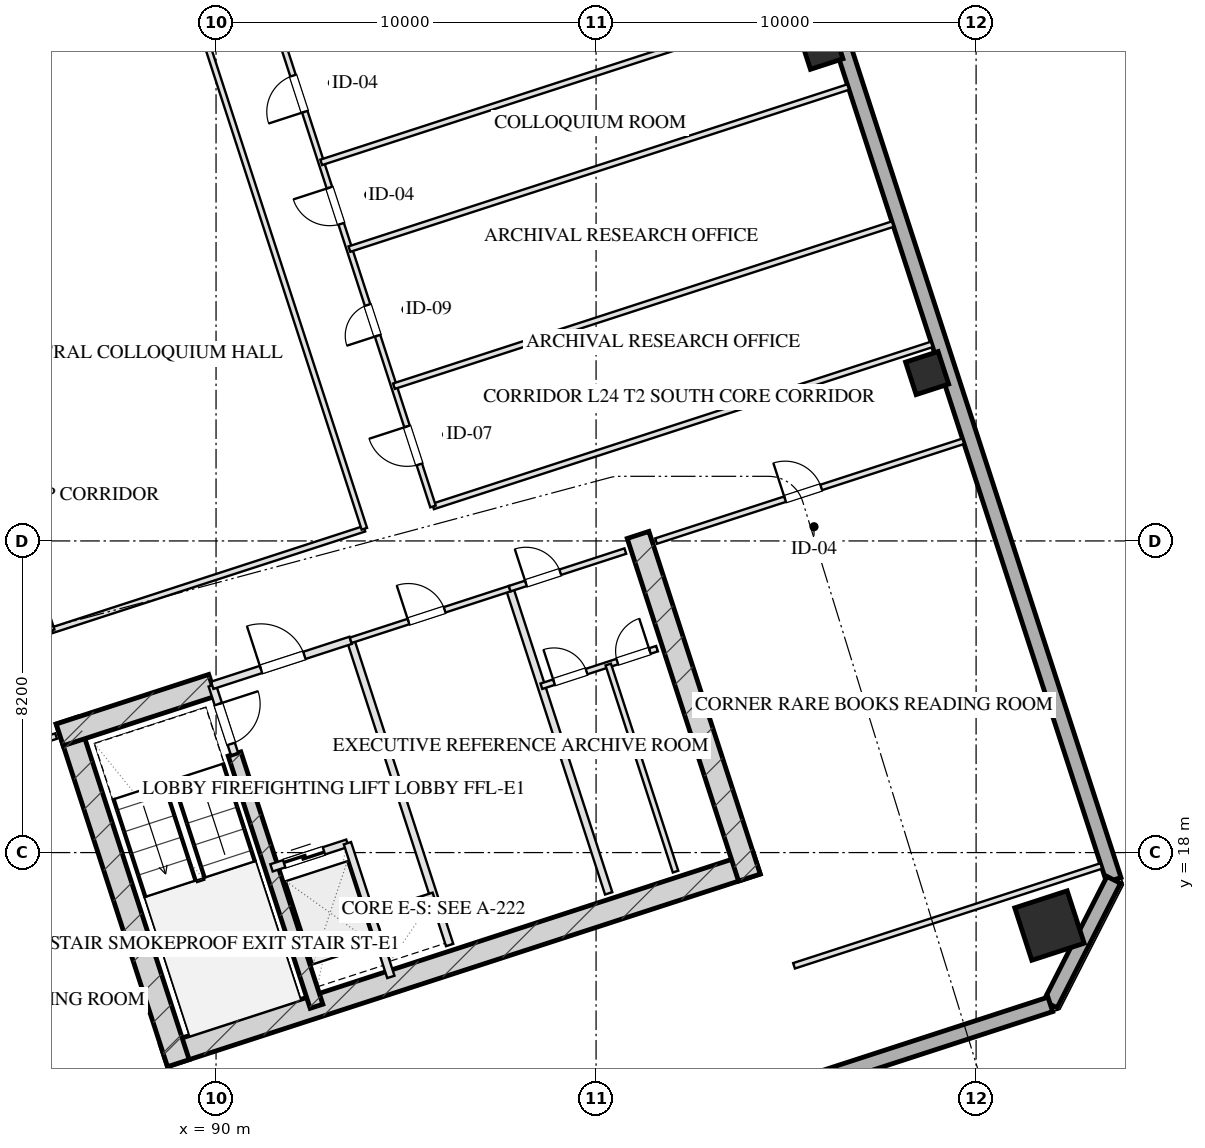
"""IFC4 building model, lengths in metres.
Left out: names, types, materials, properties, quantities, classifications, styles, units other than length and angle.
Written with IfcOpenShell. Run it as: python <this file> out.ifc"""

import sys

from ifc_helpers import new_model, si_unit, direction, frame, frame_2d, origin, origin_2d, place, context, subcontext, project, spatial, rectangle, hollow_rectangle, extrude, element, fill, save


model = new_model("IFC4")
c1 = context("Model", 3, precision=1e-05, world=origin(), true_north=direction((0.0, 1.0)))
c2 = subcontext(c1, "Body", "Model", "MODEL_VIEW")
j1 = project(units=[si_unit("LENGTHUNIT", "METRE"), si_unit("PLANEANGLEUNIT", "RADIAN")], contexts=[c1])
p1 = place(None, origin())
s1 = spatial("IfcSite", under=j1, at=p1, CompositionType="ELEMENT")
p2 = place(p1, origin())
s2 = spatial("IfcBuilding", under=s1, at=p2, CompositionType="ELEMENT")
p3 = place(p2, frame((0.0, 0.0, 96.6)))
s3 = spatial("IfcBuildingStorey", under=s2, at=p3, CompositionType="ELEMENT", Elevation=96.6)
p4 = place(p3, frame((88.63, 12.652, 0.0), z_axis=(0.0, 0.0, 1.0), x_axis=(0.95105714907, 0.309015046886, 0.0)))
e1 = element("IfcWall", 1, at=p4, inside=s3, PredefinedType="SHEAR", context=c2, shape_type="SweptSolid", body=[
    extrude(rectangle(XDim=16.4, YDim=0.6, at=frame_2d((8.2, 0.0))), origin(), (0.0, 0.0, 1.0), 3.45),
])
p5 = place(p3, frame((86.078, 21.475, 0.0), z_axis=(0.0, 0.0, 1.0), x_axis=(0.309017938678, -0.951056209472, 0.0)))
e2 = element("IfcWall", 2, at=p5, inside=s3, PredefinedType="SHEAR", context=c2, shape_type="SweptSolid", body=[
    extrude(rectangle(XDim=9.48, YDim=0.6, at=frame_2d((4.74, 0.0))), origin(), (0.0, 0.0, 1.0), 3.45),
])
p6 = place(p3, frame((101.105, 26.358, 0.0), z_axis=(0.0, 0.0, 1.0), x_axis=(0.309010370028, -0.95105866865, 0.0)))
e3 = element("IfcWall", 3, at=p6, inside=s3, PredefinedType="SHEAR", context=c2, shape_type="SweptSolid", body=[
    extrude(rectangle(XDim=9.48, YDim=0.6, at=frame_2d((4.74, 0.0))), origin(), (0.0, 0.0, 1.0), 3.45),
])
p7 = place(p3, frame((90.486, 20.594, 0.0), z_axis=(0.0, 0.0, 1.0), x_axis=(0.309020428229, -0.951055400562, 0.0)))
e4 = element("IfcWall", 4, at=p7, inside=s3, PredefinedType="SHEAR", context=c2, shape_type="SweptSolid", body=[
    extrude(rectangle(XDim=6.98, YDim=0.35, at=frame_2d((3.49, 0.0))), origin(), (0.0, 0.0, 1.0), 3.45),
])
p8 = place(p3, frame((85.886, 21.097, 0.0), z_axis=(0.0, 0.0, 1.0), x_axis=(0.951068073652, 0.308981422225, 0.0)))
e5 = element("IfcWall", 5, at=p8, inside=s3, PredefinedType="SHEAR", context=c2, shape_type="SweptSolid", body=[
    extrude(rectangle(XDim=4.22, YDim=0.6, at=frame_2d((2.11, 0.0))), origin(), (0.0, 0.0, 1.0), 3.45),
])
p9 = place(p3, frame((111.931, 16.08, 0.0), z_axis=(0.0, 0.0, 1.0), x_axis=(0.951056516295, 0.309016994375, 0.0)))
e6 = element("IfcColumn", 6, at=p9, inside=s3, PredefinedType="COLUMN", context=c2, shape_type="SweptSolid", body=[
    extrude(hollow_rectangle(XDim=1.45, YDim=1.45, WallThickness=0.05, at=origin_2d()), origin(), (0.0, 0.0, 1.0), 3.451),
])
for number, where, z_axis, x_axis in (
    (7, (108.711, 30.616, 0.0), (0.0, 0.0, 1.0), (0.951, 0.309, 0.0)),
    (8, (105.93, 39.176, 0.0), (0.0, 0.0, 1.0), (0.951, 0.309, 0.0)),
):
    element("IfcColumn", number, at=place(p3, frame(where, z_axis=z_axis, x_axis=x_axis)), inside=s3, PredefinedType="COLUMN", context=c2, shape_type="SweptSolid", body=[
        extrude(hollow_rectangle(XDim=0.9, YDim=0.9, WallThickness=0.032, at=origin_2d()), origin(), (0.0, 0.0, 1.0), 3.451),
    ])
p10 = place(p3, frame((99.284, 61.41, 0.0), z_axis=(0.0, 0.0, 1.0), x_axis=(0.309017542002, -0.95105633836, 0.0)))
e9 = element("IfcWall", 9, at=p10, inside=s3, PredefinedType="SOLIDWALL", context=c2, shape_type="SweptSolid", body=[
    extrude(rectangle(XDim=46.4, YDim=0.4, at=frame_2d((23.2, 0.0))), origin(), (0.0, 0.0, 1.0), 2.55),
])
p11 = place(p3, frame((113.623, 17.281, 0.0), z_axis=(0.0, 0.0, 1.0), x_axis=(-0.454026238093, -0.890988313685, 0.0)))
e10 = element("IfcWall", 10, at=p11, inside=s3, PredefinedType="SOLIDWALL", context=c2, shape_type="SweptSolid", body=[
    extrude(rectangle(XDim=3.677, YDim=0.4, at=frame_2d((1.838, 0.0))), origin(), (0.0, 0.0, 1.0), 2.55),
])
p12 = place(p3, frame((111.953, 14.005, 0.0), z_axis=(0.0, 0.0, 1.0), x_axis=(-0.95105505922, -0.309021478754, 0.0)))
e11 = element("IfcWall", 11, at=p12, inside=s3, PredefinedType="SOLIDWALL", context=c2, shape_type="SweptSolid", body=[
    extrude(rectangle(XDim=29.4, YDim=0.4, at=frame_2d((14.7, 0.0))), origin(), (0.0, 0.0, 1.0), 2.55),
])
p13 = place(p3, frame((89.899, 22.401, 0.0), z_axis=(0.0, 0.0, 1.0), x_axis=(0.308932062672, -0.951084108086, 0.0)))
e12 = element("IfcWall", 12, at=p13, inside=s3, PredefinedType="PARTITIONING", context=c2, shape_type="SweptSolid", body=[
    extrude(rectangle(XDim=1.9, YDim=0.2, at=frame_2d((0.95, 0.0))), origin(), (0.0, 0.0, 1.0), 3.155),
])
p14 = place(p13, frame((0.52, 0.0, 0.0)))
e13 = element("IfcOpeningElement", 13, at=p14, cuts=e12, PredefinedType="OPENING", context=c2, shape_type="SweptSolid", body=[
    extrude(rectangle(XDim=1.1, YDim=2.05, at=frame_2d((0.55, 1.025))), frame((0.0, 0.11, 0.0), z_axis=(0.0, -1.0, 0.0), x_axis=(1.0, 0.0, 0.0)), (0.0, 0.0, 1.0), 0.22),
])
p15 = place(p3, frame((93.542, 23.585, 0.0), z_axis=(0.0, 0.0, 1.0), x_axis=(0.309042196757, -0.951048327176, 0.0)))
e14 = element("IfcWall", 14, at=p15, inside=s3, PredefinedType="PARTITIONING", context=c2, shape_type="SweptSolid", body=[
    extrude(rectangle(XDim=8.43, YDim=0.2, at=frame_2d((4.215, 0.0))), origin(), (0.0, 0.0, 1.0), 3.155),
])
p16 = place(p3, frame((89.899, 22.401, 0.0), z_axis=(0.0, 0.0, 1.0), x_axis=(0.951046716504, 0.309047153403, 0.0)))
e15 = element("IfcWall", 15, at=p16, inside=s3, PredefinedType="PARTITIONING", context=c2, shape_type="SweptSolid", body=[
    extrude(rectangle(XDim=3.83, YDim=0.2, at=frame_2d((1.915, 0.0))), origin(), (0.0, 0.0, 1.0), 3.155),
])
p17 = place(p16, frame((1.35, 0.0, 0.0)))
e16 = element("IfcOpeningElement", 16, at=p17, cuts=e15, PredefinedType="OPENING", context=c2, shape_type="SweptSolid", body=[
    extrude(rectangle(XDim=1.2, YDim=2.05, at=frame_2d((0.6, 1.025))), frame((0.0, 0.11, 0.0), z_axis=(0.0, -1.0, 0.0), x_axis=(1.0, 0.0, 0.0)), (0.0, 0.0, 1.0), 0.22),
])
p18 = place(p3, frame((91.46, 17.598, 0.0), z_axis=(0.0, 0.0, 1.0), x_axis=(0.951062257173, 0.308999325213, 0.0)))
e17 = element("IfcWall", 17, at=p18, inside=s3, PredefinedType="PARTITIONING", context=c2, shape_type="SweptSolid", body=[
    extrude(rectangle(XDim=2.1, YDim=0.2, at=frame_2d((1.05, 0.0))), origin(), (0.0, 0.0, 1.0), 3.155),
])
p19 = place(p18, frame((0.35, 0.0, 0.0)))
e18 = element("IfcOpeningElement", 18, at=p19, cuts=e17, PredefinedType="OPENING", context=c2, shape_type="SweptSolid", body=[
    extrude(rectangle(XDim=1.1, YDim=2.05, at=frame_2d((0.55, 1.025))), frame((0.0, 0.11, 0.0), z_axis=(0.0, -1.0, 0.0), x_axis=(1.0, 0.0, 0.0)), (0.0, 0.0, 1.0), 0.22),
])
p20 = place(p3, frame((93.457, 18.247, 0.0), z_axis=(0.0, 0.0, 1.0), x_axis=(0.3089935693, -0.951064127245, 0.0)))
e19 = element("IfcWall", 19, at=p20, inside=s3, PredefinedType="PARTITIONING", context=c2, shape_type="SweptSolid", body=[
    extrude(rectangle(XDim=3.7, YDim=0.2, at=frame_2d((1.85, 0.0))), origin(), (0.0, 0.0, 1.0), 3.155),
])
p21 = place(p3, frame((94.084, 16.317, 0.0), z_axis=(0.0, 0.0, 1.0), x_axis=(0.951041328149, 0.309063734775, 0.0)))
e20 = element("IfcWall", 20, at=p21, inside=s3, PredefinedType="PARTITIONING", context=c2, shape_type="SweptSolid", body=[
    extrude(rectangle(XDim=1.73, YDim=0.2, at=frame_2d((0.865, 0.0))), origin(), (0.0, 0.0, 1.0), 3.155),
])
p22 = place(p3, frame((97.727, 24.944, 0.0), z_axis=(0.0, 0.0, 1.0), x_axis=(0.309016001439, -0.951056838919, 0.0)))
e21 = element("IfcWall", 21, at=p22, inside=s3, PredefinedType="PARTITIONING", context=c2, shape_type="SweptSolid", body=[
    extrude(rectangle(XDim=8.43, YDim=0.2, at=frame_2d((4.215, 0.0))), origin(), (0.0, 0.0, 1.0), 3.155),
])
p23 = place(p3, frame((93.542, 23.585, 0.0), z_axis=(0.0, 0.0, 1.0), x_axis=(0.951063829732, 0.308994485023, 0.0)))
e22 = element("IfcWall", 22, at=p23, inside=s3, PredefinedType="PARTITIONING", context=c2, shape_type="SweptSolid", body=[
    extrude(rectangle(XDim=4.4, YDim=0.15, at=frame_2d((2.2, 0.0))), origin(), (0.0, 0.0, 1.0), 3.155),
])
p24 = place(p23, frame((1.6, 0.0, 0.0)))
e23 = element("IfcOpeningElement", 23, at=p24, cuts=e22, PredefinedType="OPENING", context=c2, shape_type="SweptSolid", body=[
    extrude(rectangle(XDim=1.0, YDim=2.05, at=frame_2d((0.5, 1.025))), frame((0.0, 0.085, 0.0), z_axis=(0.0, -1.0, 0.0), x_axis=(1.0, 0.0, 0.0)), (0.0, 0.0, 1.0), 0.17),
])
p25 = place(p3, frame((97.727, 24.944, 0.0), z_axis=(0.0, 0.0, 1.0), x_axis=(0.951036872128, 0.309077446369, 0.0)))
e24 = element("IfcWall", 24, at=p25, inside=s3, PredefinedType="PARTITIONING", context=c2, shape_type="SweptSolid", body=[
    extrude(rectangle(XDim=3.2, YDim=0.15, at=frame_2d((1.6, 0.0))), origin(), (0.0, 0.0, 1.0), 3.155),
])
p26 = place(p25, frame((0.45, 0.0, 0.0)))
e25 = element("IfcOpeningElement", 25, at=p26, cuts=e24, PredefinedType="OPENING", context=c2, shape_type="SweptSolid", body=[
    extrude(rectangle(XDim=0.95, YDim=2.05, at=frame_2d((0.475, 1.025))), frame((0.0, 0.085, 0.0), z_axis=(0.0, -1.0, 0.0), x_axis=(1.0, 0.0, 0.0)), (0.0, 0.0, 1.0), 0.17),
])
p27 = place(p3, frame((98.561, 22.376, 0.0), z_axis=(0.0, 0.0, 1.0), x_axis=(0.95104415986, 0.309055020985, 0.0)))
e26 = element("IfcWall", 26, at=p27, inside=s3, PredefinedType="PARTITIONING", context=c2, shape_type="SweptSolid", body=[
    extrude(rectangle(XDim=3.2, YDim=0.15, at=frame_2d((1.6, 0.0))), origin(), (0.0, 0.0, 1.0), 3.155),
])
p28 = place(p27, frame((0.35, 0.0, 0.0)))
e27 = element("IfcOpeningElement", 27, at=p28, cuts=e26, PredefinedType="OPENING", context=c2, shape_type="SweptSolid", body=[
    extrude(rectangle(XDim=0.9, YDim=2.05, at=frame_2d((0.45, 1.025))), frame((0.0, 0.085, 0.0), z_axis=(0.0, -1.0, 0.0), x_axis=(1.0, 0.0, 0.0)), (0.0, 0.0, 1.0), 0.17),
])
p29 = place(p27, frame((2.1, 0.0, 0.0)))
e28 = element("IfcOpeningElement", 28, at=p29, cuts=e26, PredefinedType="OPENING", context=c2, shape_type="SweptSolid", body=[
    extrude(rectangle(XDim=0.9, YDim=2.05, at=frame_2d((0.45, 1.025))), frame((0.0, 0.085, 0.0), z_axis=(0.0, -1.0, 0.0), x_axis=(1.0, 0.0, 0.0)), (0.0, 0.0, 1.0), 0.17),
])
p30 = place(p3, frame((100.32, 22.948, 0.0), z_axis=(0.0, 0.0, 1.0), x_axis=(0.309035009867, -0.951050662518, 0.0)))
e29 = element("IfcWall", 29, at=p30, inside=s3, PredefinedType="PARTITIONING", context=c2, shape_type="SweptSolid", body=[
    extrude(rectangle(XDim=5.73, YDim=0.15, at=frame_2d((2.865, 0.0))), origin(), (0.0, 0.0, 1.0), 3.155),
])
p31 = place(p3, frame((77.136, 18.254, 0.0), z_axis=(0.0, 0.0, 1.0), x_axis=(0.951057133767, 0.309015093986, 0.0)))
e30 = element("IfcWall", 30, at=p31, inside=s3, PredefinedType="PARTITIONING", context=c2, shape_type="SweptSolid", body=[
    extrude(rectangle(XDim=9.1, YDim=0.15, at=frame_2d((4.55, 0.0))), origin(), (0.0, 0.0, 1.0), 3.155),
])
p32 = place(p31, frame((3.822, 0.0, 0.0)))
e31 = element("IfcOpeningElement", 31, at=p32, cuts=e30, PredefinedType="OPENING", context=c2, shape_type="SweptSolid", body=[
    extrude(rectangle(XDim=1.0, YDim=2.05, at=frame_2d((0.5, 1.025))), frame((0.0, 0.085, 0.0), z_axis=(0.0, -1.0, 0.0), x_axis=(1.0, 0.0, 0.0)), (0.0, 0.0, 1.0), 0.17),
])
p33 = place(p3, frame((105.209, 15.021, 0.0), z_axis=(0.0, 0.0, 1.0), x_axis=(0.951054329824, 0.309023723562, 0.0)))
e32 = element("IfcWall", 32, at=p33, inside=s3, PredefinedType="PARTITIONING", context=c2, shape_type="SweptSolid", body=[
    extrude(rectangle(XDim=8.5, YDim=0.15, at=frame_2d((4.25, 0.0))), origin(), (0.0, 0.0, 1.0), 3.155),
])
p34 = place(p3, frame((101.578, 26.196, 0.0), z_axis=(0.0, 0.0, 1.0), x_axis=(0.951062770994, 0.308997743729, 0.0)))
e33 = element("IfcWall", 33, at=p34, inside=s3, PredefinedType="PARTITIONING", context=c2, shape_type="SweptSolid", body=[
    extrude(rectangle(XDim=8.5, YDim=0.15, at=frame_2d((4.25, 0.0))), origin(), (0.0, 0.0, 1.0), 3.155),
])
p35 = place(p34, frame((3.57, 0.0, 0.0)))
e34 = element("IfcOpeningElement", 34, at=p35, cuts=e33, PredefinedType="OPENING", context=c2, shape_type="SweptSolid", body=[
    extrude(rectangle(XDim=1.0, YDim=2.05, at=frame_2d((0.5, 1.025))), frame((0.0, 0.085, 0.0), z_axis=(0.0, -1.0, 0.0), x_axis=(1.0, 0.0, 0.0)), (0.0, 0.0, 1.0), 0.17),
])
p36 = place(p3, frame((85.676, 23.847, 0.0), z_axis=(0.0, 0.0, 1.0), x_axis=(0.951063309554, 0.308996086091, 0.0)))
e35 = element("IfcWall", 35, at=p36, inside=s3, PredefinedType="PARTITIONING", context=c2, shape_type="SweptSolid", body=[
    extrude(rectangle(XDim=8.65, YDim=0.15, at=frame_2d((4.325, 0.0))), origin(), (0.0, 0.0, 1.0), 3.155),
])
p37 = place(p3, frame((95.709, 27.107, 0.0), z_axis=(0.0, 0.0, 1.0), x_axis=(0.951056688031, 0.309016465825, 0.0)))
e36 = element("IfcWall", 36, at=p37, inside=s3, PredefinedType="PARTITIONING", context=c2, shape_type="SweptSolid", body=[
    extrude(rectangle(XDim=13.8, YDim=0.15, at=frame_2d((6.9, 0.0))), origin(), (0.0, 0.0, 1.0), 3.155),
])
p38 = place(p3, frame((85.676, 23.847, 0.0), z_axis=(0.0, 0.0, 1.0), x_axis=(-0.309008771245, 0.951059188113, 0.0)))
e37 = element("IfcWall", 37, at=p38, inside=s3, PredefinedType="PARTITIONING", context=c2, shape_type="SweptSolid", body=[
    extrude(rectangle(XDim=16.64, YDim=0.15, at=frame_2d((8.32, 0.0))), origin(), (0.0, 0.0, 1.0), 3.155),
])
p39 = place(p38, frame((7.987, 0.0, 0.0)))
e38 = element("IfcOpeningElement", 38, at=p39, cuts=e37, PredefinedType="OPENING", context=c2, shape_type="SweptSolid", body=[
    extrude(rectangle(XDim=1.1, YDim=2.05, at=frame_2d((0.55, 1.025))), frame((0.0, 0.085, 0.0), z_axis=(0.0, -1.0, 0.0), x_axis=(1.0, 0.0, 0.0)), (0.0, 0.0, 1.0), 0.17),
])
p40 = place(p3, frame((93.903, 26.52, 0.0), z_axis=(0.0, 0.0, 1.0), x_axis=(-0.30901773025, 0.951056277195, 0.0)))
e39 = element("IfcWall", 39, at=p40, inside=s3, PredefinedType="PARTITIONING", context=c2, shape_type="SweptSolid", body=[
    extrude(rectangle(XDim=16.64, YDim=0.15, at=frame_2d((8.32, 0.0))), origin(), (0.0, 0.0, 1.0), 3.155),
])
p41 = place(p3, frame((95.709, 27.107, 0.0), z_axis=(0.0, 0.0, 1.0), x_axis=(-0.30901773025, 0.951056277195, 0.0)))
e40 = element("IfcWall", 40, at=p41, inside=s3, PredefinedType="PARTITIONING", context=c2, shape_type="SweptSolid", body=[
    extrude(rectangle(XDim=16.64, YDim=0.15, at=frame_2d((8.32, 0.0))), origin(), (0.0, 0.0, 1.0), 3.155),
])
p42 = place(p41, frame((1.164, 0.0, 0.0)))
e41 = element("IfcOpeningElement", 41, at=p42, cuts=e40, PredefinedType="OPENING", context=c2, shape_type="SweptSolid", body=[
    extrude(rectangle(XDim=1.05, YDim=2.05, at=frame_2d((0.525, 1.025))), frame((0.0, 0.085, 0.0), z_axis=(0.0, -1.0, 0.0), x_axis=(1.0, 0.0, 0.0)), (0.0, 0.0, 1.0), 0.17),
])
p43 = place(p41, frame((4.724, 0.0, 0.0)))
e42 = element("IfcOpeningElement", 42, at=p43, cuts=e40, PredefinedType="OPENING", context=c2, shape_type="SweptSolid", body=[
    extrude(rectangle(XDim=0.85, YDim=2.05, at=frame_2d((0.425, 1.025))), frame((0.0, 0.085, 0.0), z_axis=(0.0, -1.0, 0.0), x_axis=(1.0, 0.0, 0.0)), (0.0, 0.0, 1.0), 0.17),
])
p44 = place(p41, frame((7.82, 0.0, 0.0)))
e43 = element("IfcOpeningElement", 43, at=p44, cuts=e40, PredefinedType="OPENING", context=c2, shape_type="SweptSolid", body=[
    extrude(rectangle(XDim=1.0, YDim=2.05, at=frame_2d((0.5, 1.025))), frame((0.0, 0.085, 0.0), z_axis=(0.0, -1.0, 0.0), x_axis=(1.0, 0.0, 0.0)), (0.0, 0.0, 1.0), 0.17),
])
p45 = place(p41, frame((10.92, 0.0, 0.0)))
e44 = element("IfcOpeningElement", 44, at=p45, cuts=e40, PredefinedType="OPENING", context=c2, shape_type="SweptSolid", body=[
    extrude(rectangle(XDim=1.0, YDim=2.05, at=frame_2d((0.5, 1.025))), frame((0.0, 0.085, 0.0), z_axis=(0.0, -1.0, 0.0), x_axis=(1.0, 0.0, 0.0)), (0.0, 0.0, 1.0), 0.17),
])
p46 = place(p41, frame((14.48, 0.0, 0.0)))
e45 = element("IfcOpeningElement", 45, at=p46, cuts=e40, PredefinedType="OPENING", context=c2, shape_type="SweptSolid", body=[
    extrude(rectangle(XDim=1.0, YDim=2.05, at=frame_2d((0.5, 1.025))), frame((0.0, 0.085, 0.0), z_axis=(0.0, -1.0, 0.0), x_axis=(1.0, 0.0, 0.0)), (0.0, 0.0, 1.0), 0.17),
])
p47 = place(p3, frame((94.681, 30.272, 0.0), z_axis=(0.0, 0.0, 1.0), x_axis=(0.951051488548, 0.309032467762, 0.0)))
e46 = element("IfcWall", 46, at=p47, inside=s3, PredefinedType="PARTITIONING", context=c2, shape_type="SweptSolid", body=[
    extrude(rectangle(XDim=13.8, YDim=0.15, at=frame_2d((6.9, 0.0))), origin(), (0.0, 0.0, 1.0), 3.155),
])
p48 = place(p3, frame((93.509, 33.878, 0.0), z_axis=(0.0, 0.0, 1.0), x_axis=(0.951056688031, 0.309016465825, 0.0)))
e47 = element("IfcWall", 47, at=p48, inside=s3, PredefinedType="PARTITIONING", context=c2, shape_type="SweptSolid", body=[
    extrude(rectangle(XDim=13.8, YDim=0.15, at=frame_2d((6.9, 0.0))), origin(), (0.0, 0.0, 1.0), 3.155),
])
p49 = place(p3, frame((92.768, 36.161, 0.0), z_axis=(0.0, 0.0, 1.0), x_axis=(0.951058377365, 0.309011266531, 0.0)))
e48 = element("IfcWall", 48, at=p49, inside=s3, PredefinedType="PARTITIONING", context=c2, shape_type="SweptSolid", body=[
    extrude(rectangle(XDim=13.8, YDim=0.15, at=frame_2d((6.9, 0.0))), origin(), (0.0, 0.0, 1.0), 3.155),
])
p50 = place(p14, origin())
e49 = element("IfcDoor", 49, at=p50, inside=s3, OperationType="SINGLE_SWING_LEFT", PredefinedType="DOOR", context=c2, shape_type="SweptSolid", body=[
    extrude(rectangle(XDim=1.1, YDim=2.05, at=frame_2d((0.55, 1.025))), frame((0.0, 0.025, 0.0), z_axis=(0.0, -1.0, 0.0), x_axis=(1.0, 0.0, 0.0)), (0.0, 0.0, 1.0), 0.05),
])
fill(e13, e49)
p51 = place(p17, origin())
e50 = element("IfcDoor", 50, at=p51, inside=s3, OperationType="SINGLE_SWING_LEFT", PredefinedType="DOOR", context=c2, shape_type="SweptSolid", body=[
    extrude(rectangle(XDim=1.2, YDim=2.05, at=frame_2d((0.6, 1.025))), frame((0.0, 0.025, 0.0), z_axis=(0.0, -1.0, 0.0), x_axis=(1.0, 0.0, 0.0)), (0.0, 0.0, 1.0), 0.05),
])
fill(e16, e50)
p52 = place(p19, origin())
e51 = element("IfcDoor", 51, at=p52, inside=s3, OperationType="DOUBLE_DOOR_SLIDING", PredefinedType="DOOR", context=c2, shape_type="SweptSolid", body=[
    extrude(rectangle(XDim=1.1, YDim=2.05, at=frame_2d((0.55, 1.025))), frame((0.0, 0.025, 0.0), z_axis=(0.0, -1.0, 0.0), x_axis=(1.0, 0.0, 0.0)), (0.0, 0.0, 1.0), 0.05),
])
fill(e18, e51)
p53 = place(p24, origin())
e52 = element("IfcDoor", 52, at=p53, inside=s3, OperationType="SINGLE_SWING_LEFT", PredefinedType="DOOR", context=c2, shape_type="SweptSolid", body=[
    extrude(rectangle(XDim=1.0, YDim=2.05, at=frame_2d((0.5, 1.025))), frame((0.0, 0.025, 0.0), z_axis=(0.0, -1.0, 0.0), x_axis=(1.0, 0.0, 0.0)), (0.0, 0.0, 1.0), 0.05),
])
fill(e23, e52)
p54 = place(p26, origin())
e53 = element("IfcDoor", 53, at=p54, inside=s3, OperationType="SINGLE_SWING_LEFT", PredefinedType="DOOR", context=c2, shape_type="SweptSolid", body=[
    extrude(rectangle(XDim=0.95, YDim=2.05, at=frame_2d((0.475, 1.025))), frame((0.0, 0.025, 0.0), z_axis=(0.0, -1.0, 0.0), x_axis=(1.0, 0.0, 0.0)), (0.0, 0.0, 1.0), 0.05),
])
fill(e25, e53)
p55 = place(p28, origin())
e54 = element("IfcDoor", 54, at=p55, inside=s3, OperationType="SINGLE_SWING_LEFT", PredefinedType="DOOR", context=c2, shape_type="SweptSolid", body=[
    extrude(rectangle(XDim=0.9, YDim=2.05, at=frame_2d((0.45, 1.025))), frame((0.0, 0.025, 0.0), z_axis=(0.0, -1.0, 0.0), x_axis=(1.0, 0.0, 0.0)), (0.0, 0.0, 1.0), 0.05),
])
fill(e27, e54)
p56 = place(p29, origin())
e55 = element("IfcDoor", 55, at=p56, inside=s3, OperationType="SINGLE_SWING_RIGHT", PredefinedType="DOOR", context=c2, shape_type="SweptSolid", body=[
    extrude(rectangle(XDim=0.9, YDim=2.05, at=frame_2d((0.45, 1.025))), frame((0.0, 0.025, 0.0), z_axis=(0.0, -1.0, 0.0), x_axis=(1.0, 0.0, 0.0)), (0.0, 0.0, 1.0), 0.05),
])
fill(e28, e55)
p57 = place(p35, origin())
e56 = element("IfcDoor", 56, at=p57, inside=s3, OperationType="SINGLE_SWING_LEFT", PredefinedType="DOOR", context=c2, shape_type="SweptSolid", body=[
    extrude(rectangle(XDim=1.0, YDim=2.05, at=frame_2d((0.5, 1.025))), frame((0.0, 0.025, 0.0), z_axis=(0.0, -1.0, 0.0), x_axis=(1.0, 0.0, 0.0)), (0.0, 0.0, 1.0), 0.05),
])
fill(e34, e56)
p58 = place(p42, origin())
e57 = element("IfcDoor", 57, at=p58, inside=s3, OperationType="SINGLE_SWING_RIGHT", PredefinedType="DOOR", context=c2, shape_type="SweptSolid", body=[
    extrude(rectangle(XDim=1.05, YDim=2.05, at=frame_2d((0.525, 1.025))), frame((0.0, 0.025, 0.0), z_axis=(0.0, -1.0, 0.0), x_axis=(1.0, 0.0, 0.0)), (0.0, 0.0, 1.0), 0.05),
])
fill(e41, e57)
p59 = place(p43, origin())
e58 = element("IfcDoor", 58, at=p59, inside=s3, OperationType="SINGLE_SWING_LEFT", PredefinedType="DOOR", context=c2, shape_type="SweptSolid", body=[
    extrude(rectangle(XDim=0.85, YDim=2.05, at=frame_2d((0.425, 1.025))), frame((0.0, 0.025, 0.0), z_axis=(0.0, -1.0, 0.0), x_axis=(1.0, 0.0, 0.0)), (0.0, 0.0, 1.0), 0.05),
])
fill(e42, e58)
p60 = place(p44, origin())
e59 = element("IfcDoor", 59, at=p60, inside=s3, OperationType="SINGLE_SWING_RIGHT", PredefinedType="DOOR", context=c2, shape_type="SweptSolid", body=[
    extrude(rectangle(XDim=1.0, YDim=2.05, at=frame_2d((0.5, 1.025))), frame((0.0, 0.025, 0.0), z_axis=(0.0, -1.0, 0.0), x_axis=(1.0, 0.0, 0.0)), (0.0, 0.0, 1.0), 0.05),
])
fill(e43, e59)
p61 = place(p45, origin())
e60 = element("IfcDoor", 60, at=p61, inside=s3, OperationType="SINGLE_SWING_LEFT", PredefinedType="DOOR", context=c2, shape_type="SweptSolid", body=[
    extrude(rectangle(XDim=1.0, YDim=2.05, at=frame_2d((0.5, 1.025))), frame((0.0, 0.025, 0.0), z_axis=(0.0, -1.0, 0.0), x_axis=(1.0, 0.0, 0.0)), (0.0, 0.0, 1.0), 0.05),
])
fill(e44, e60)
save(model, sys.argv[1])
